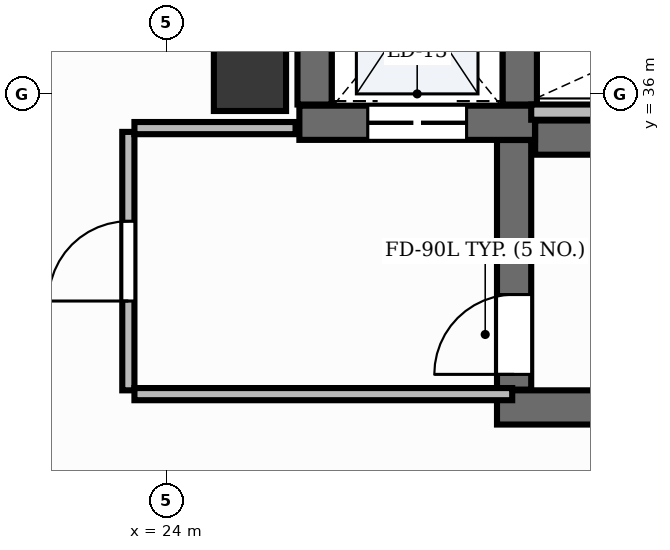
"""IFC4 building model, lengths in metres.
Left out: names, types, materials, properties, quantities, classifications, styles, units other than length and angle.
Written with IfcOpenShell. Run it as: python <this file> out.ifc"""

import sys

from ifc_helpers import new_model, si_unit, direction, frame, frame_2d, origin, origin_2d, place, context, subcontext, project, spatial, rectangle, extrude, element, fill, save


model = new_model("IFC4")
c1 = context("Model", 3, precision=1e-05, world=origin(), true_north=direction((0.0, 1.0)))
c2 = subcontext(c1, "Body", "Model", "MODEL_VIEW")
j1 = project(units=[si_unit("LENGTHUNIT", "METRE"), si_unit("PLANEANGLEUNIT", "RADIAN")], contexts=[c1])
p1 = place(None, origin())
s1 = spatial("IfcSite", under=j1, at=p1, CompositionType="ELEMENT")
p2 = place(p1, origin())
s2 = spatial("IfcBuilding", under=s1, at=p2, CompositionType="ELEMENT")
p3 = place(p2, frame((0.0, 0.0, 46.8)))
s3 = spatial("IfcBuildingStorey", under=s2, at=p3, CompositionType="ELEMENT", Elevation=46.8)
p4 = place(p3, frame((28.852, 35.425, 0.0), z_axis=(0.0, 0.0, 1.0), x_axis=(1.0, 0.0, 0.0)))
e1 = element("IfcWall", 1, at=p4, inside=s3, PredefinedType="SHEAR", context=c2, shape_type="SweptSolid", body=[
    extrude(rectangle(XDim=8.248, YDim=0.45, at=frame_2d((4.124, 0.0))), origin(), (0.0, 0.0, 1.0), 3.9),
])
p5 = place(p3, frame((28.35, 31.875, 0.0), z_axis=(0.0, 0.0, 1.0), x_axis=(1.0, 0.0, 0.0)))
e2 = element("IfcWall", 2, at=p5, inside=s3, PredefinedType="SHEAR", context=c2, shape_type="SweptSolid", body=[
    extrude(rectangle(XDim=8.75, YDim=0.45, at=frame_2d((4.375, 0.0))), origin(), (0.0, 0.0, 1.0), 3.9),
])
p6 = place(p3, frame((28.575, 32.11, 0.0), z_axis=(0.0, 0.0, 1.0), x_axis=(0.0, 1.0, 0.0)))
e3 = element("IfcWall", 3, at=p6, inside=s3, PredefinedType="SHEAR", context=c2, shape_type="SweptSolid", body=[
    extrude(rectangle(XDim=3.283, YDim=0.45, at=frame_2d((1.642, 0.0))), origin(), (0.0, 0.0, 1.0), 3.9),
])
p7 = place(p6, frame((0.2, 0.0, 0.0)))
e4 = element("IfcOpeningElement", 4, at=p7, cuts=e3, PredefinedType="OPENING", context=c2, shape_type="SweptSolid", body=[
    extrude(rectangle(XDim=1.05, YDim=2.15, at=frame_2d((0.525, 1.075))), frame((0.0, 0.24, 0.0), z_axis=(0.0, -1.0, 0.0), x_axis=(1.0, 0.0, 0.0)), (0.0, 0.0, 1.0), 0.48),
])
p8 = place(p3, frame((25.75, 35.62, 0.0), z_axis=(0.0, 0.0, 1.0), x_axis=(1.0, 0.0, 0.0)))
e5 = element("IfcWall", 5, at=p8, inside=s3, PredefinedType="SHEAR", context=c2, shape_type="SweptSolid", body=[
    extrude(rectangle(XDim=3.1, YDim=0.45, at=frame_2d((1.55, 0.0))), origin(), (0.0, 0.0, 1.0), 3.9),
])
p9 = place(p8, frame((0.9, 0.0, 0.0)))
e6 = element("IfcOpeningElement", 6, at=p9, cuts=e5, PredefinedType="OPENING", context=c2, shape_type="SweptSolid", body=[
    extrude(rectangle(XDim=1.3, YDim=2.2, at=frame_2d((0.65, 1.1))), frame((0.0, 0.24, 0.0), z_axis=(0.0, -1.0, 0.0), x_axis=(1.0, 0.0, 0.0)), (0.0, 0.0, 1.0), 0.48),
])
for number, where, z_axis, x_axis in (
    (7, (25.95, 35.86, 0.0), (0.0, 0.0, 1.0), (0.0, 1.0, 0.0)),
    (8, (28.65, 35.86, 0.0), (0.0, 0.0, 1.0), (0.0, 1.0, 0.0)),
):
    element("IfcWall", number, at=place(p3, frame(where, z_axis=z_axis, x_axis=x_axis)), inside=s3, PredefinedType="SHEAR", context=c2, shape_type="SweptSolid", body=[
        extrude(rectangle(XDim=2.7, YDim=0.45, at=frame_2d((1.35, 0.0))), origin(), (0.0, 0.0, 1.0), 3.9),
    ])
p10 = place(p3, frame((25.1, 36.25, -0.0), z_axis=(0.0, 0.0, 1.0), x_axis=(1.0, 0.0, 0.0)))
e9 = element("IfcColumn", 9, at=p10, inside=s3, PredefinedType="PILASTER", context=c2, shape_type="SweptSolid", body=[
    extrude(rectangle(XDim=0.95, YDim=0.95, at=origin_2d()), origin(), (0.0, 0.0, 1.0), 3.901),
])
p11 = place(p3, frame((28.8, 35.76, 0.0), z_axis=(0.0, 0.0, 1.0), x_axis=(1.0, 0.0, 0.0)))
e10 = element("IfcWall", 10, at=p11, inside=s3, PredefinedType="PARTITIONING", context=c2, shape_type="SweptSolid", body=[
    extrude(rectangle(XDim=4.57, YDim=0.2, at=frame_2d((2.285, 0.0))), origin(), (0.0, 0.0, 1.0), 2.91),
])
p12 = place(p3, frame((23.5, 32.1, 0.0), z_axis=(0.0, 0.0, 1.0), x_axis=(0.0, 1.0, 0.0)))
e11 = element("IfcWall", 11, at=p12, inside=s3, PredefinedType="PARTITIONING", context=c2, shape_type="SweptSolid", body=[
    extrude(rectangle(XDim=3.4, YDim=0.16, at=frame_2d((1.7, 0.0))), origin(), (0.0, 0.0, 1.0), 2.91),
])
p13 = place(p12, frame((1.175, 0.0, 0.0)))
e12 = element("IfcOpeningElement", 12, at=p13, cuts=e11, PredefinedType="OPENING", context=c2, shape_type="SweptSolid", body=[
    extrude(rectangle(XDim=1.05, YDim=2.15, at=frame_2d((0.525, 1.075))), frame((0.0, 0.095, 0.0), z_axis=(0.0, -1.0, 0.0), x_axis=(1.0, 0.0, 0.0)), (0.0, 0.0, 1.0), 0.19),
])
p14 = place(p3, frame((23.58, 32.05, 0.0), z_axis=(0.0, 0.0, 1.0), x_axis=(1.0, 0.0, 0.0)))
e13 = element("IfcWall", 13, at=p14, inside=s3, PredefinedType="PARTITIONING", context=c2, shape_type="SweptSolid", body=[
    extrude(rectangle(XDim=4.97, YDim=0.16, at=frame_2d((2.485, 0.0))), origin(), (0.0, 0.0, 1.0), 2.91),
])
p15 = place(p3, frame((23.58, 35.55, 0.0), z_axis=(0.0, 0.0, 1.0), x_axis=(1.0, 0.0, 0.0)))
e14 = element("IfcWall", 14, at=p15, inside=s3, PredefinedType="PARTITIONING", context=c2, shape_type="SweptSolid", body=[
    extrude(rectangle(XDim=2.12, YDim=0.16, at=frame_2d((1.06, 0.0))), origin(), (0.0, 0.0, 1.0), 2.91),
])
p16 = place(p7, origin())
e15 = element("IfcDoor", 15, at=p16, inside=s3, OperationType="SINGLE_SWING_LEFT", PredefinedType="DOOR", context=c2, shape_type="SweptSolid", body=[
    extrude(rectangle(XDim=1.05, YDim=2.15, at=frame_2d((0.525, 1.075))), frame((0.0, 0.025, 0.0), z_axis=(0.0, -1.0, 0.0), x_axis=(1.0, 0.0, 0.0)), (0.0, 0.0, 1.0), 0.05),
])
fill(e4, e15)
p17 = place(p9, origin())
e16 = element("IfcDoor", 16, at=p17, inside=s3, OperationType="DOUBLE_DOOR_SLIDING", PredefinedType="DOOR", context=c2, shape_type="SweptSolid", body=[
    extrude(rectangle(XDim=1.3, YDim=2.2, at=frame_2d((0.65, 1.1))), frame((0.0, 0.025, 0.0), z_axis=(0.0, -1.0, 0.0), x_axis=(1.0, 0.0, 0.0)), (0.0, 0.0, 1.0), 0.05),
])
fill(e6, e16)
p18 = place(p13, origin())
e17 = element("IfcDoor", 17, at=p18, inside=s3, OperationType="SINGLE_SWING_LEFT", PredefinedType="DOOR", context=c2, shape_type="SweptSolid", body=[
    extrude(rectangle(XDim=1.05, YDim=2.15, at=frame_2d((0.525, 1.075))), frame((0.0, 0.025, 0.0), z_axis=(0.0, -1.0, 0.0), x_axis=(1.0, 0.0, 0.0)), (0.0, 0.0, 1.0), 0.05),
])
fill(e12, e17)
save(model, sys.argv[1])
